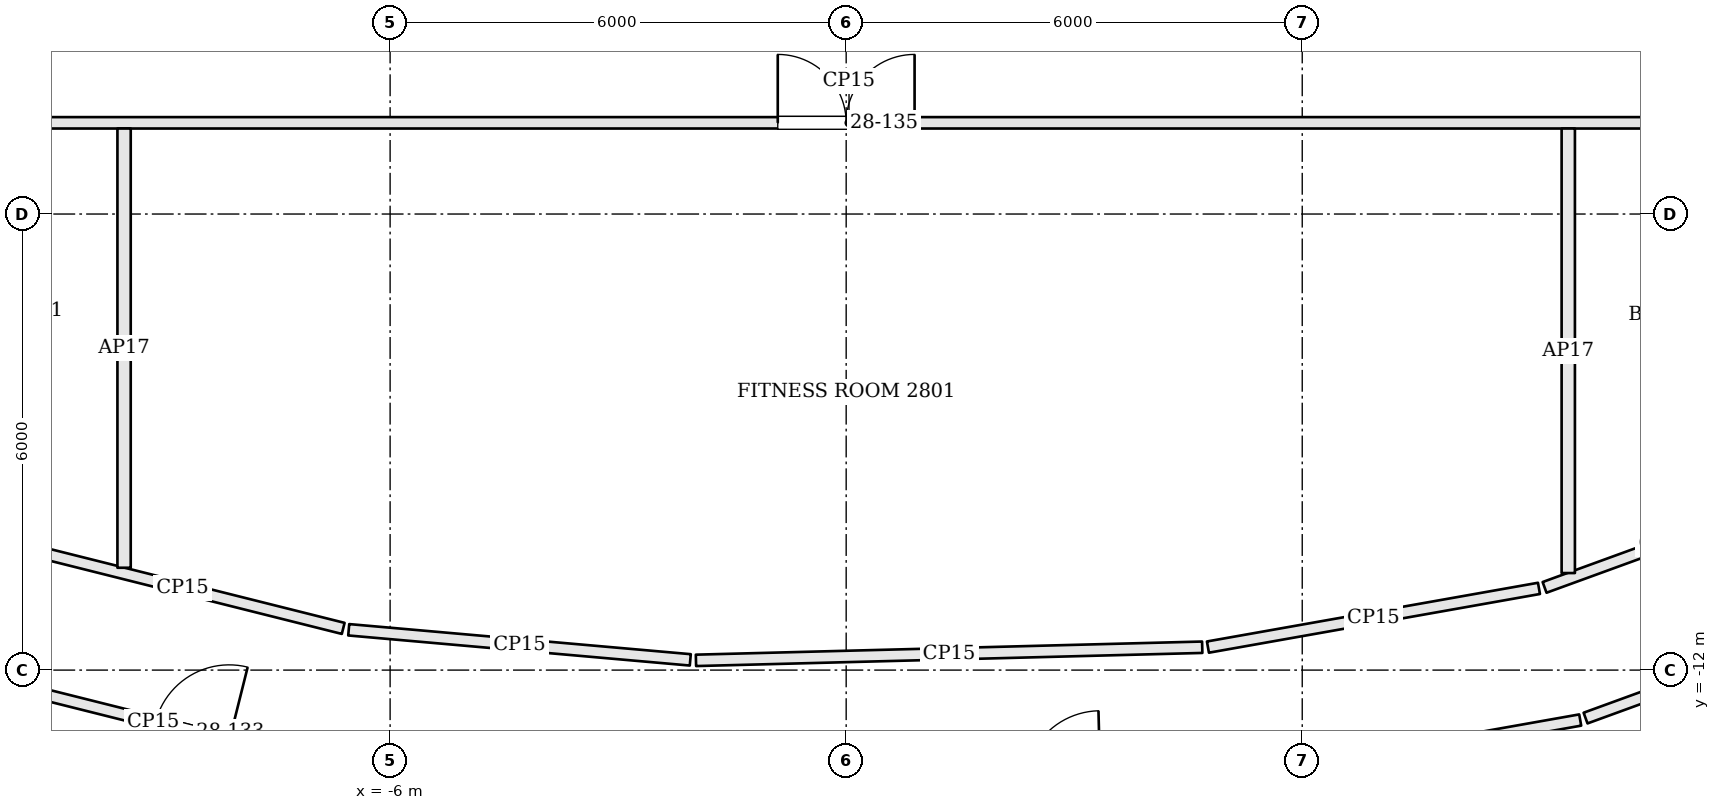
"""IFC4 building model, lengths in metres.
Left out: names, types, materials, properties, quantities, classifications, styles, units other than length and angle.
Written with IfcOpenShell. Run it as: python <this file> out.ifc"""

import sys

from ifc_helpers import new_model, si_unit, direction, frame, frame_2d, origin, place, context, subcontext, project, spatial, rectangle, extrude, element, fill, save


model = new_model("IFC4")
c1 = context("Model", 3, precision=1e-05, world=origin(), true_north=direction((0.0, 1.0)))
c2 = subcontext(c1, "Body", "Model", "MODEL_VIEW")
j1 = project(units=[si_unit("LENGTHUNIT", "METRE"), si_unit("PLANEANGLEUNIT", "RADIAN")], contexts=[c1])
p1 = place(None, origin())
s1 = spatial("IfcSite", under=j1, at=p1, CompositionType="ELEMENT")
p2 = place(p1, origin())
s2 = spatial("IfcBuilding", under=s1, at=p2, CompositionType="ELEMENT")
p3 = place(p2, frame((0.0, 0.0, 117.6)))
s3 = spatial("IfcBuildingStorey", under=s2, at=p3, CompositionType="ELEMENT", Elevation=117.6)
p4 = place(p3, frame((5.697, -13.359, 0.0), z_axis=(0.0, 0.0, 1.0), x_axis=(0.984641449362, 0.174588705818, 0.0)))
e1 = element("IfcWall", 1, at=p4, inside=s3, PredefinedType="PARTITIONING", context=c2, shape_type="SweptSolid", body=[
    extrude(rectangle(XDim=4.022, YDim=0.15, at=frame_2d((2.011, 0.0))), origin(), (0.0, 0.0, 1.0), 2.684),
])
p5 = place(p3, frame((9.728, -12.631, 0.0), z_axis=(0.0, 0.0, 1.0), x_axis=(0.939626438181, 0.342201923826, 0.0)))
e2 = element("IfcWall", 2, at=p5, inside=s3, PredefinedType="PARTITIONING", context=c2, shape_type="SweptSolid", body=[
    extrude(rectangle(XDim=3.716, YDim=0.15, at=frame_2d((1.858, 0.0))), origin(), (0.0, 0.0, 1.0), 2.684),
])
p6 = place(p3, frame((-11.387, -12.111, 0.0), z_axis=(0.0, 0.0, 1.0), x_axis=(0.96999205549, -0.243136612393, 0.0)))
e3 = element("IfcWall", 3, at=p6, inside=s3, PredefinedType="PARTITIONING", context=c2, shape_type="SweptSolid", body=[
    extrude(rectangle(XDim=4.683, YDim=0.15, at=frame_2d((2.342, 0.0))), origin(), (0.0, 0.0, 1.0), 2.684),
])
p7 = place(p6, frame((2.371, 0.0, 0.0)))
e4 = element("IfcOpeningElement", 4, at=p7, cuts=e3, PredefinedType="OPENING", context=c2, shape_type="SweptSolid", body=[
    extrude(rectangle(XDim=1.0, YDim=2.1, at=frame_2d((0.5, 1.05))), frame((0.0, 0.085, 0.0), z_axis=(0.0, -1.0, 0.0), x_axis=(1.0, 0.0, 0.0)), (0.0, 0.0, 1.0), 0.17),
])
p8 = place(p3, frame((12.353, -9.76, 0.0), z_axis=(0.0, 0.0, 1.0), x_axis=(-0.939632450309, -0.342185415127, 0.0)))
e5 = element("IfcWall", 5, at=p8, inside=s3, PredefinedType="PARTITIONING", context=c2, shape_type="SweptSolid", body=[
    extrude(rectangle(XDim=3.368, YDim=0.15, at=frame_2d((1.684, 0.0))), origin(), (0.0, 0.0, 1.0), 2.684),
])
p9 = place(p3, frame((9.115, -10.925, 0.0), z_axis=(0.0, 0.0, 1.0), x_axis=(-0.984632605417, -0.174638576352, 0.0)))
e6 = element("IfcWall", 6, at=p9, inside=s3, PredefinedType="PARTITIONING", context=c2, shape_type="SweptSolid", body=[
    extrude(rectangle(XDim=4.423, YDim=0.15, at=frame_2d((2.211, 0.0))), origin(), (0.0, 0.0, 1.0), 2.684),
])
p10 = place(p3, frame((4.684, -11.699, 0.0), z_axis=(0.0, 0.0, 1.0), x_axis=(-0.999663438204, -0.025942442425, 0.0)))
e7 = element("IfcWall", 7, at=p10, inside=s3, PredefinedType="PARTITIONING", context=c2, shape_type="SweptSolid", body=[
    extrude(rectangle(XDim=6.663, YDim=0.15, at=frame_2d((3.332, 0.0))), origin(), (0.0, 0.0, 1.0), 2.684),
])
p11 = place(p3, frame((-2.051, -11.865, 0.0), z_axis=(0.0, 0.0, 1.0), x_axis=(-0.996139599493, 0.087783246245, 0.0)))
e8 = element("IfcWall", 8, at=p11, inside=s3, PredefinedType="PARTITIONING", context=c2, shape_type="SweptSolid", body=[
    extrude(rectangle(XDim=4.511, YDim=0.15, at=frame_2d((2.255, 0.0))), origin(), (0.0, 0.0, 1.0), 2.684),
])
p12 = place(p3, frame((-6.617, -11.451, 0.0), z_axis=(0.0, 0.0, 1.0), x_axis=(-0.969987441267, 0.243155020069, 0.0)))
e9 = element("IfcWall", 9, at=p12, inside=s3, PredefinedType="PARTITIONING", context=c2, shape_type="SweptSolid", body=[
    extrude(rectangle(XDim=4.359, YDim=0.15, at=frame_2d((2.179, 0.0))), origin(), (0.0, 0.0, 1.0), 2.684),
])
p13 = place(p3, frame((-14.725, -4.8, 0.0), z_axis=(0.0, 0.0, 1.0), x_axis=(1.0, 0.0, 0.0)))
e10 = element("IfcWall", 10, at=p13, inside=s3, PredefinedType="PARTITIONING", context=c2, shape_type="SweptSolid", body=[
    extrude(rectangle(XDim=29.525, YDim=0.15, at=frame_2d((14.763, 0.0))), origin(), (0.0, 0.0, 1.0), 2.684),
])
p14 = place(p13, frame((13.825, 0.0, 0.0)))
e11 = element("IfcOpeningElement", 11, at=p14, cuts=e10, PredefinedType="OPENING", context=c2, shape_type="SweptSolid", body=[
    extrude(rectangle(XDim=1.8, YDim=2.1, at=frame_2d((0.9, 1.05))), frame((0.0, 0.085, 0.0), z_axis=(0.0, -1.0, 0.0), x_axis=(1.0, 0.0, 0.0)), (0.0, 0.0, 1.0), 0.17),
])
p15 = place(p3, frame((-9.5, -10.654, 0.0), z_axis=(0.0, 0.0, 1.0), x_axis=(0.0, 1.0, 0.0)))
e12 = element("IfcWall", 12, at=p15, inside=s3, PredefinedType="PARTITIONING", context=c2, shape_type="SweptSolid", body=[
    extrude(rectangle(XDim=5.779, YDim=0.175, at=frame_2d((2.889, 0.0))), origin(), (0.0, 0.0, 1.0), 2.684),
])
p16 = place(p3, frame((9.5, -10.723, 0.0), z_axis=(0.0, 0.0, 1.0), x_axis=(0.0, 1.0, 0.0)))
e13 = element("IfcWall", 13, at=p16, inside=s3, PredefinedType="PARTITIONING", context=c2, shape_type="SweptSolid", body=[
    extrude(rectangle(XDim=5.848, YDim=0.175, at=frame_2d((2.924, 0.0))), origin(), (0.0, 0.0, 1.0), 2.684),
])
p17 = place(p7, origin())
e14 = element("IfcDoor", 14, at=p17, inside=s3, OperationType="SINGLE_SWING_RIGHT", PredefinedType="DOOR", context=c2, shape_type="SweptSolid", body=[
    extrude(rectangle(XDim=1.0, YDim=2.1, at=frame_2d((0.5, 1.05))), frame((0.0, 0.025, 0.0), z_axis=(0.0, -1.0, 0.0), x_axis=(1.0, 0.0, 0.0)), (0.0, 0.0, 1.0), 0.05),
])
fill(e4, e14)
p18 = place(p14, origin())
e15 = element("IfcDoor", 15, at=p18, inside=s3, OperationType="DOUBLE_DOOR_SINGLE_SWING", PredefinedType="DOOR", context=c2, shape_type="SweptSolid", body=[
    extrude(rectangle(XDim=1.8, YDim=2.1, at=frame_2d((0.9, 1.05))), frame((0.0, 0.025, 0.0), z_axis=(0.0, -1.0, 0.0), x_axis=(1.0, 0.0, 0.0)), (0.0, 0.0, 1.0), 0.05),
])
fill(e11, e15)
save(model, sys.argv[1])
